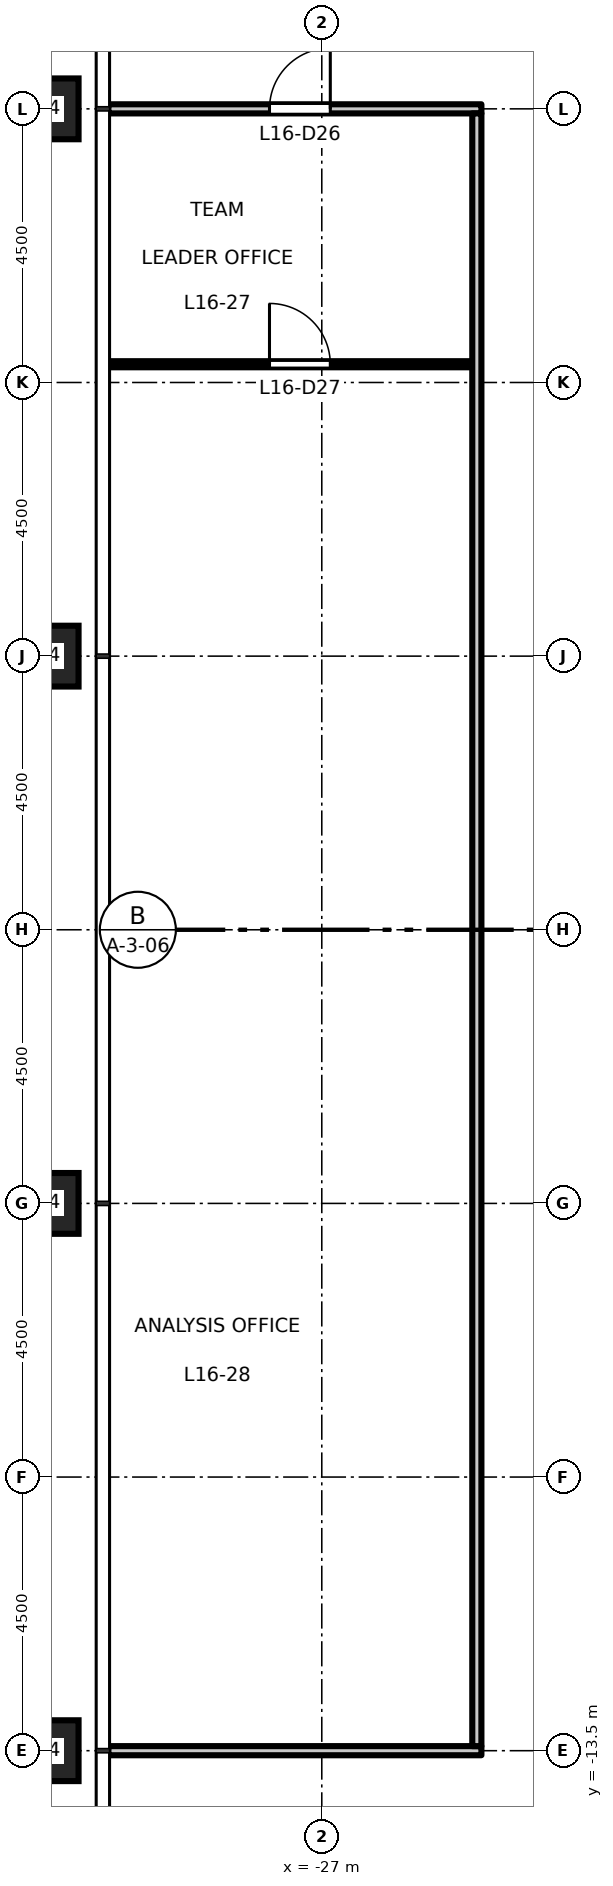
"""IFC4 building model, lengths in metres.
Left out: names, types, materials, properties, quantities, classifications, styles, units other than length and angle.
Written with IfcOpenShell. Run it as: python <this file> out.ifc"""

import sys

from ifc_helpers import new_model, si_unit, direction, frame, frame_2d, origin, origin_2d, place, context, subcontext, project, spatial, rectangle, hollow_rectangle, extrude, element, fill, save


model = new_model("IFC4")
c1 = context("Model", 3, precision=1e-05, world=origin(), true_north=direction((0.0, 1.0)))
c2 = subcontext(c1, "Body", "Model", "MODEL_VIEW")
j1 = project(units=[si_unit("LENGTHUNIT", "METRE"), si_unit("PLANEANGLEUNIT", "RADIAN")], contexts=[c1])
p1 = place(None, origin())
s1 = spatial("IfcSite", under=j1, at=p1, CompositionType="ELEMENT")
p2 = place(p1, origin())
s2 = spatial("IfcBuilding", under=s1, at=p2, CompositionType="ELEMENT")
p3 = place(p2, frame((0.0, 0.0, 76.2)))
s3 = spatial("IfcBuildingStorey", under=s2, at=p3, CompositionType="ELEMENT", Elevation=76.2)
for number, where, z_axis, x_axis in (
    (1, (-31.5, 13.5, 0.0), (0.0, 0.0, 1.0), (1.0, 0.0, 0.0)),
    (2, (-31.5, 4.5, 0.0), (0.0, 0.0, 1.0), (1.0, 0.0, 0.0)),
    (3, (-31.5, -4.5, 0.0), (0.0, 0.0, 1.0), (1.0, 0.0, 0.0)),
    (4, (-31.5, -13.5, 0.0), (0.0, 0.0, 1.0), (1.0, 0.0, 0.0)),
):
    element("IfcColumn", number, at=place(p3, frame(where, z_axis=z_axis, x_axis=x_axis)), inside=s3, PredefinedType="COLUMN", context=c2, shape_type="SweptSolid", body=[
        extrude(hollow_rectangle(XDim=1.0, YDim=1.0, WallThickness=0.06, at=origin_2d()), origin(), (0.0, 0.0, 1.0), 4.5),
    ])
p4 = place(p3, frame((-30.51, -13.5, 0.0), z_axis=(0.0, 0.0, 1.0), x_axis=(1.0, 0.0, 0.0)))
e5 = element("IfcWall", 5, at=p4, inside=s3, PredefinedType="PARTITIONING", context=c2, shape_type="SweptSolid", body=[
    extrude(rectangle(XDim=6.135, YDim=0.15, at=frame_2d((3.067, 0.0))), origin(), (0.0, 0.0, 1.0), 3.35),
])
p5 = place(p3, frame((-30.51, 9.3, 0.0), z_axis=(0.0, 0.0, 1.0), x_axis=(1.0, 0.0, 0.0)))
e6 = element("IfcWall", 6, at=p5, inside=s3, PredefinedType="PARTITIONING", context=c2, shape_type="SweptSolid", body=[
    extrude(rectangle(XDim=5.985, YDim=0.1, at=frame_2d((2.993, 0.0))), origin(), (0.0, 0.0, 1.0), 4.35),
])
p6 = place(p5, frame((2.65, 0.0, 0.0)))
e7 = element("IfcOpeningElement", 7, at=p6, cuts=e6, PredefinedType="OPENING", context=c2, shape_type="SweptSolid", body=[
    extrude(rectangle(XDim=1.0, YDim=2.1, at=frame_2d((0.5, 1.05))), frame((0.0, 0.06, 0.0), z_axis=(0.0, -1.0, 0.0), x_axis=(1.0, 0.0, 0.0)), (0.0, 0.0, 1.0), 0.12),
])
p7 = place(p3, frame((-30.51, 13.5, 0.0), z_axis=(0.0, 0.0, 1.0), x_axis=(1.0, 0.0, 0.0)))
e8 = element("IfcWall", 8, at=p7, inside=s3, PredefinedType="PARTITIONING", context=c2, shape_type="SweptSolid", body=[
    extrude(rectangle(XDim=6.135, YDim=0.15, at=frame_2d((3.067, 0.0))), origin(), (0.0, 0.0, 1.0), 3.35),
])
p8 = place(p7, frame((2.65, 0.0, 0.0)))
e9 = element("IfcOpeningElement", 9, at=p8, cuts=e8, PredefinedType="OPENING", context=c2, shape_type="SweptSolid", body=[
    extrude(rectangle(XDim=1.0, YDim=2.1, at=frame_2d((0.5, 1.05))), frame((0.0, 0.085, 0.0), z_axis=(0.0, -1.0, 0.0), x_axis=(1.0, 0.0, 0.0)), (0.0, 0.0, 1.0), 0.17),
])
p9 = place(p3, frame((-24.45, -13.425, 0.0), z_axis=(0.0, 0.0, 1.0), x_axis=(0.0, 1.0, 0.0)))
e10 = element("IfcWall", 10, at=p9, inside=s3, PredefinedType="PARTITIONING", context=c2, shape_type="SweptSolid", body=[
    extrude(rectangle(XDim=26.85, YDim=0.15, at=frame_2d((13.425, 0.0))), origin(), (0.0, 0.0, 1.0), 4.35),
])
p10 = place(p8, origin())
e11 = element("IfcDoor", 11, at=p10, inside=s3, OperationType="SINGLE_SWING_RIGHT", PredefinedType="DOOR", context=c2, shape_type="SweptSolid", body=[
    extrude(rectangle(XDim=1.0, YDim=2.1, at=frame_2d((0.5, 1.05))), frame((0.0, 0.025, 0.0), z_axis=(0.0, -1.0, 0.0), x_axis=(1.0, 0.0, 0.0)), (0.0, 0.0, 1.0), 0.05),
])
fill(e9, e11)
p11 = place(p6, origin())
e12 = element("IfcDoor", 12, at=p11, inside=s3, OperationType="SINGLE_SWING_LEFT", PredefinedType="DOOR", context=c2, shape_type="SweptSolid", body=[
    extrude(rectangle(XDim=1.0, YDim=2.1, at=frame_2d((0.5, 1.05))), frame((0.0, 0.025, 0.0), z_axis=(0.0, -1.0, 0.0), x_axis=(1.0, 0.0, 0.0)), (0.0, 0.0, 1.0), 0.05),
])
fill(e7, e12)
save(model, sys.argv[1])
